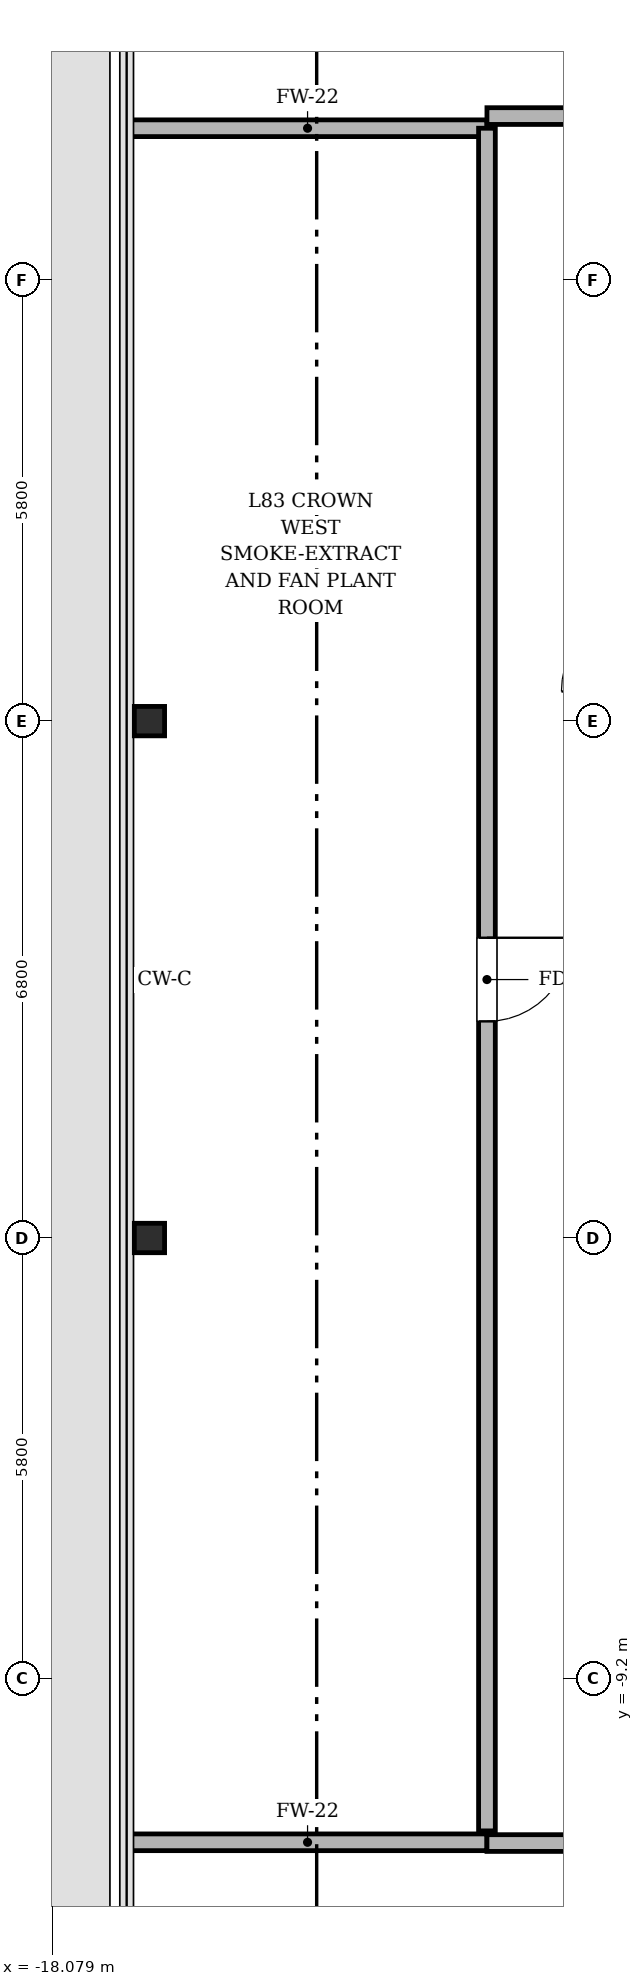
"""IFC4 building model, lengths in metres.
Left out: names, types, materials, properties, quantities, classifications, styles, units other than length and angle.
Written with IfcOpenShell. Run it as: python <this file> out.ifc"""

import sys

from ifc_helpers import new_model, si_unit, direction, frame, frame_2d, origin, origin_2d, place, context, subcontext, project, spatial, rectangle, i_section, extrude, element, fill, save


model = new_model("IFC4")
c1 = context("Model", 3, precision=1e-05, world=origin(), true_north=direction((0.0, 1.0)))
c2 = subcontext(c1, "Body", "Model", "MODEL_VIEW")
j1 = project(units=[si_unit("LENGTHUNIT", "METRE"), si_unit("PLANEANGLEUNIT", "RADIAN")], contexts=[c1])
p1 = place(None, origin())
s1 = spatial("IfcSite", under=j1, at=p1, CompositionType="ELEMENT")
p2 = place(p1, origin())
s2 = spatial("IfcBuilding", under=s1, at=p2, CompositionType="ELEMENT")
p3 = place(p2, frame((0.0, 0.0, 352.8)))
s3 = spatial("IfcBuildingStorey", under=s2, at=p3, CompositionType="ELEMENT", Elevation=352.8)
for number, where, z_axis, x_axis in (
    (1, (-16.8, -3.4, 0.0), (0.0, 0.0, 1.0), (1.0, 0.0, 0.0)),
    (2, (-16.8, 3.4, 0.0), (0.0, 0.0, 1.0), (1.0, 0.0, 0.0)),
):
    element("IfcColumn", number, at=place(p3, frame(where, z_axis=z_axis, x_axis=x_axis)), inside=s3, PredefinedType="COLUMN", context=c2, shape_type="SweptSolid", body=[
        extrude(i_section(OverallWidth=0.398, OverallDepth=0.387, WebThickness=0.021, FlangeThickness=0.033, FilletRadius=0.018, at=origin_2d()), origin(), (0.0, 0.0, 1.0), 4.498),
    ])
p4 = place(p3, frame((-17.08, -11.35, 0.0), z_axis=(0.0, 0.0, 1.0), x_axis=(1.0, 0.0, 0.0)))
e3 = element("IfcWall", 3, at=p4, inside=s3, PredefinedType="SOLIDWALL", context=c2, shape_type="SweptSolid", body=[
    extrude(rectangle(XDim=4.72, YDim=0.22, at=frame_2d((2.36, 0.0))), origin(), (0.0, 0.0, 1.0), 2.994),
])
p5 = place(p3, frame((-12.36, -11.36, 0.0), z_axis=(0.0, 0.0, 1.0), x_axis=(1.0, 0.0, 0.0)))
e4 = element("IfcWall", 4, at=p5, inside=s3, PredefinedType="SOLIDWALL", context=c2, shape_type="SweptSolid", body=[
    extrude(rectangle(XDim=24.72, YDim=0.22, at=frame_2d((12.36, 0.0))), origin(), (0.0, 0.0, 1.0), 2.994),
])
p6 = place(p5, frame((11.81, 0.0, 0.0)))
e5 = element("IfcOpeningElement", 5, at=p6, cuts=e4, PredefinedType="OPENING", context=c2, shape_type="SweptSolid", body=[
    extrude(rectangle(XDim=1.1, YDim=2.2, at=frame_2d((0.55, 1.1))), frame((0.0, 0.12, 0.0), z_axis=(0.0, -1.0, 0.0), x_axis=(1.0, 0.0, 0.0)), (0.0, 0.0, 1.0), 0.24),
])
p7 = place(p3, frame((-17.08, 11.2, 0.0), z_axis=(0.0, 0.0, 1.0), x_axis=(1.0, 0.0, 0.0)))
e6 = element("IfcWall", 6, at=p7, inside=s3, PredefinedType="SOLIDWALL", context=c2, shape_type="SweptSolid", body=[
    extrude(rectangle(XDim=4.72, YDim=0.22, at=frame_2d((2.36, 0.0))), origin(), (0.0, 0.0, 1.0), 2.994),
])
p8 = place(p3, frame((-12.36, 11.2, 0.0), z_axis=(0.0, 0.0, 1.0), x_axis=(0.0, -1.0, 0.0)))
e7 = element("IfcWall", 7, at=p8, inside=s3, PredefinedType="SOLIDWALL", context=c2, shape_type="SweptSolid", body=[
    extrude(rectangle(XDim=22.4, YDim=0.22, at=frame_2d((11.2, 0.0))), origin(), (0.0, 0.0, 1.0), 2.994),
])
p9 = place(p8, frame((10.65, 0.0, 0.0)))
e8 = element("IfcOpeningElement", 8, at=p9, cuts=e7, PredefinedType="OPENING", context=c2, shape_type="SweptSolid", body=[
    extrude(rectangle(XDim=1.1, YDim=2.2, at=frame_2d((0.55, 1.1))), frame((0.0, 0.12, 0.0), z_axis=(0.0, -1.0, 0.0), x_axis=(1.0, 0.0, 0.0)), (0.0, 0.0, 1.0), 0.24),
])
p10 = place(p3, frame((12.36, 11.36, 0.0), z_axis=(0.0, 0.0, 1.0), x_axis=(-1.0, 0.0, 0.0)))
e9 = element("IfcWall", 9, at=p10, inside=s3, PredefinedType="SOLIDWALL", context=c2, shape_type="SweptSolid", body=[
    extrude(rectangle(XDim=24.72, YDim=0.22, at=frame_2d((12.36, 0.0))), origin(), (0.0, 0.0, 1.0), 2.994),
])
p11 = place(p10, frame((11.81, 0.0, 0.0)))
e10 = element("IfcOpeningElement", 10, at=p11, cuts=e9, PredefinedType="OPENING", context=c2, shape_type="SweptSolid", body=[
    extrude(rectangle(XDim=1.1, YDim=2.2, at=frame_2d((0.55, 1.1))), frame((0.0, 0.12, 0.0), z_axis=(0.0, -1.0, 0.0), x_axis=(1.0, 0.0, 0.0)), (0.0, 0.0, 1.0), 0.24),
])
p12 = place(p9, origin())
e11 = element("IfcDoor", 11, at=p12, inside=s3, OperationType="SINGLE_SWING_LEFT", PredefinedType="DOOR", context=c2, shape_type="SweptSolid", body=[
    extrude(rectangle(XDim=1.1, YDim=2.2, at=frame_2d((0.55, 1.1))), frame((0.0, 0.025, 0.0), z_axis=(0.0, -1.0, 0.0), x_axis=(1.0, 0.0, 0.0)), (0.0, 0.0, 1.0), 0.05),
])
fill(e8, e11)
save(model, sys.argv[1])
